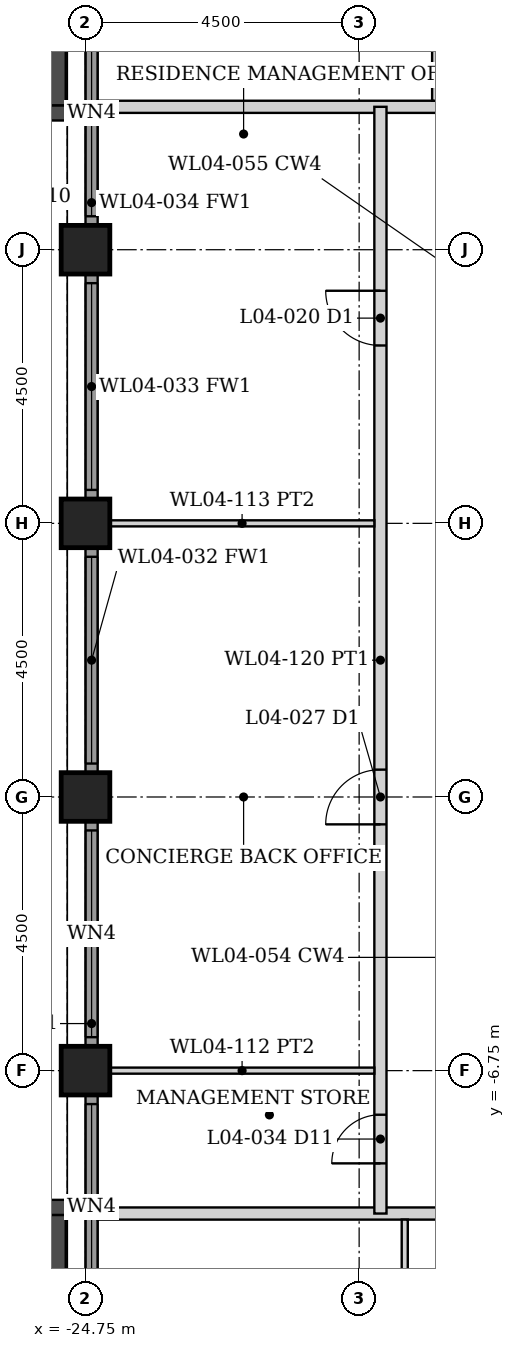
"""IFC4 building model, lengths in metres.
Left out: names, types, materials, properties, quantities, classifications, styles, units other than length and angle.
Written with IfcOpenShell. Run it as: python <this file> out.ifc"""

import sys

from ifc_helpers import new_model, si_unit, direction, frame, frame_2d, origin, origin_2d, place, context, subcontext, project, spatial, rectangle, hollow_rectangle, extrude, element, fill, save


model = new_model("IFC4")
c1 = context("Model", 3, precision=1e-05, world=origin(), true_north=direction((0.0, 1.0)))
c2 = subcontext(c1, "Body", "Model", "MODEL_VIEW")
j1 = project(units=[si_unit("LENGTHUNIT", "METRE"), si_unit("PLANEANGLEUNIT", "RADIAN")], contexts=[c1])
p1 = place(None, origin())
s1 = spatial("IfcSite", under=j1, at=p1, CompositionType="ELEMENT")
p2 = place(p1, origin())
s2 = spatial("IfcBuilding", under=s1, at=p2, CompositionType="ELEMENT")
p3 = place(p2, frame((0.0, 0.0, 21.5)))
s3 = spatial("IfcBuildingStorey", under=s2, at=p3, CompositionType="ELEMENT", Elevation=21.5)
for number, where, z_axis, x_axis in (
    (1, (-24.75, -6.75, 0.0), (0.0, 0.0, 1.0), (1.0, 0.0, 0.0)),
    (2, (-24.75, -2.25, 0.0), (0.0, 0.0, 1.0), (1.0, 0.0, 0.0)),
    (3, (-24.75, 2.25, 0.0), (0.0, 0.0, 1.0), (1.0, 0.0, 0.0)),
    (4, (-24.75, 6.75, 0.0), (0.0, 0.0, 1.0), (1.0, 0.0, 0.0)),
):
    element("IfcColumn", number, at=place(p3, frame(where, z_axis=z_axis, x_axis=x_axis)), inside=s3, PredefinedType="COLUMN", context=c2, shape_type="SweptSolid", body=[
        extrude(hollow_rectangle(XDim=0.8, YDim=0.8, WallThickness=0.08, at=origin_2d()), origin(), (0.0, 0.0, 1.0), 5.0),
    ])
p4 = place(p3, frame((-28.625, 9.0, 0.0), z_axis=(0.0, 0.0, 1.0), x_axis=(1.0, 0.0, 0.0)))
e5 = element("IfcWall", 5, at=p4, inside=s3, PredefinedType="SHEAR", context=c2, shape_type="SweptSolid", body=[
    extrude(rectangle(XDim=3.55, YDim=0.25, at=frame_2d((1.775, 0.0))), origin(), (0.0, 0.0, 1.0), 5.0),
])
p5 = place(p4, frame((1.875, 0.0, 0.0)))
e6 = element("IfcOpeningElement", 6, at=p5, cuts=e5, PredefinedType="OPENING", context=c2, shape_type="SweptSolid", body=[
    extrude(rectangle(XDim=1.2, YDim=2.2, at=frame_2d((0.6, 1.1))), frame((0.0, 0.135, 0.0), z_axis=(0.0, -1.0, 0.0), x_axis=(1.0, 0.0, 0.0)), (0.0, 0.0, 1.0), 0.27),
])
p6 = place(p3, frame((-25.2, 9.125, 0.0), z_axis=(0.0, 0.0, 1.0), x_axis=(0.0, 1.0, 0.0)))
e7 = element("IfcWall", 7, at=p6, inside=s3, PredefinedType="SHEAR", context=c2, shape_type="SweptSolid", body=[
    extrude(rectangle(XDim=7.25, YDim=0.25, at=frame_2d((3.625, 0.0))), origin(), (0.0, 0.0, 1.0), 5.0),
])
p7 = place(p3, frame((-28.625, -9.0, 0.0), z_axis=(0.0, 0.0, 1.0), x_axis=(1.0, 0.0, 0.0)))
e8 = element("IfcWall", 8, at=p7, inside=s3, PredefinedType="SHEAR", context=c2, shape_type="SweptSolid", body=[
    extrude(rectangle(XDim=3.55, YDim=0.25, at=frame_2d((1.775, 0.0))), origin(), (0.0, 0.0, 1.0), 5.0),
])
p8 = place(p7, frame((1.875, 0.0, 0.0)))
e9 = element("IfcOpeningElement", 9, at=p8, cuts=e8, PredefinedType="OPENING", context=c2, shape_type="SweptSolid", body=[
    extrude(rectangle(XDim=1.2, YDim=2.2, at=frame_2d((0.6, 1.1))), frame((0.0, 0.135, 0.0), z_axis=(0.0, -1.0, 0.0), x_axis=(1.0, 0.0, 0.0)), (0.0, 0.0, 1.0), 0.27),
])
p9 = place(p3, frame((-25.2, -16.375, 0.0), z_axis=(0.0, 0.0, 1.0), x_axis=(0.0, 1.0, 0.0)))
e10 = element("IfcWall", 10, at=p9, inside=s3, PredefinedType="SHEAR", context=c2, shape_type="SweptSolid", body=[
    extrude(rectangle(XDim=7.25, YDim=0.25, at=frame_2d((3.625, 0.0))), origin(), (0.0, 0.0, 1.0), 5.0),
])
p10 = place(p3, frame((-24.65, -10.845, 0.0), z_axis=(0.0, 0.0, 1.0), x_axis=(0.0, 1.0, 0.0)))
e11 = element("IfcWall", 11, at=p10, inside=s3, PredefinedType="SOLIDWALL", context=c2, shape_type="SweptSolid", body=[
    extrude(rectangle(XDim=3.69, YDim=0.2, at=frame_2d((1.845, 0.0))), origin(), (0.0, 0.0, 1.0), 3.879),
])
p11 = place(p10, frame((0.145, 0.0, 0.3)))
e12 = element("IfcOpeningElement", 12, at=p11, cuts=e11, PredefinedType="OPENING", context=c2, shape_type="SweptSolid", body=[
    extrude(rectangle(XDim=3.4, YDim=3.429, at=frame_2d((1.7, 1.714))), frame((0.0, 0.11, 0.0), z_axis=(0.0, -1.0, 0.0), x_axis=(1.0, 0.0, 0.0)), (0.0, 0.0, 1.0), 0.22),
])
p12 = place(p3, frame((-24.65, -6.345, 0.0), z_axis=(0.0, 0.0, 1.0), x_axis=(0.0, 1.0, 0.0)))
e13 = element("IfcWall", 13, at=p12, inside=s3, PredefinedType="SOLIDWALL", context=c2, shape_type="SweptSolid", body=[
    extrude(rectangle(XDim=3.69, YDim=0.2, at=frame_2d((1.845, 0.0))), origin(), (0.0, 0.0, 1.0), 3.879),
])
p13 = place(p12, frame((0.145, 0.0, 0.3)))
e14 = element("IfcOpeningElement", 14, at=p13, cuts=e13, PredefinedType="OPENING", context=c2, shape_type="SweptSolid", body=[
    extrude(rectangle(XDim=3.4, YDim=3.429, at=frame_2d((1.7, 1.714))), frame((0.0, 0.11, 0.0), z_axis=(0.0, -1.0, 0.0), x_axis=(1.0, 0.0, 0.0)), (0.0, 0.0, 1.0), 0.22),
])
p14 = place(p3, frame((-24.65, -1.845, 0.0), z_axis=(0.0, 0.0, 1.0), x_axis=(0.0, 1.0, 0.0)))
e15 = element("IfcWall", 15, at=p14, inside=s3, PredefinedType="SOLIDWALL", context=c2, shape_type="SweptSolid", body=[
    extrude(rectangle(XDim=3.69, YDim=0.2, at=frame_2d((1.845, 0.0))), origin(), (0.0, 0.0, 1.0), 3.879),
])
p15 = place(p14, frame((0.145, 0.0, 0.3)))
e16 = element("IfcOpeningElement", 16, at=p15, cuts=e15, PredefinedType="OPENING", context=c2, shape_type="SweptSolid", body=[
    extrude(rectangle(XDim=3.4, YDim=3.429, at=frame_2d((1.7, 1.714))), frame((0.0, 0.11, 0.0), z_axis=(0.0, -1.0, 0.0), x_axis=(1.0, 0.0, 0.0)), (0.0, 0.0, 1.0), 0.22),
])
p16 = place(p3, frame((-24.65, 2.655, 0.0), z_axis=(0.0, 0.0, 1.0), x_axis=(0.0, 1.0, 0.0)))
e17 = element("IfcWall", 17, at=p16, inside=s3, PredefinedType="SOLIDWALL", context=c2, shape_type="SweptSolid", body=[
    extrude(rectangle(XDim=3.69, YDim=0.2, at=frame_2d((1.845, 0.0))), origin(), (0.0, 0.0, 1.0), 3.879),
])
p17 = place(p16, frame((0.145, 0.0, 0.3)))
e18 = element("IfcOpeningElement", 18, at=p17, cuts=e17, PredefinedType="OPENING", context=c2, shape_type="SweptSolid", body=[
    extrude(rectangle(XDim=3.4, YDim=3.429, at=frame_2d((1.7, 1.714))), frame((0.0, 0.11, 0.0), z_axis=(0.0, -1.0, 0.0), x_axis=(1.0, 0.0, 0.0)), (0.0, 0.0, 1.0), 0.22),
])
p18 = place(p3, frame((-24.65, 7.155, 0.0), z_axis=(0.0, 0.0, 1.0), x_axis=(0.0, 1.0, 0.0)))
e19 = element("IfcWall", 19, at=p18, inside=s3, PredefinedType="SOLIDWALL", context=c2, shape_type="SweptSolid", body=[
    extrude(rectangle(XDim=3.69, YDim=0.2, at=frame_2d((1.845, 0.0))), origin(), (0.0, 0.0, 1.0), 3.879),
])
p19 = place(p18, frame((0.145, 0.0, 0.3)))
e20 = element("IfcOpeningElement", 20, at=p19, cuts=e19, PredefinedType="OPENING", context=c2, shape_type="SweptSolid", body=[
    extrude(rectangle(XDim=3.4, YDim=3.429, at=frame_2d((1.7, 1.714))), frame((0.0, 0.11, 0.0), z_axis=(0.0, -1.0, 0.0), x_axis=(1.0, 0.0, 0.0)), (0.0, 0.0, 1.0), 0.22),
])
p20 = place(p3, frame((-24.55, 9.1, 0.0), z_axis=(0.0, 0.0, 1.0), x_axis=(1.0, 0.0, 0.0)))
e21 = element("IfcWall", 21, at=p20, inside=s3, PredefinedType="PARTITIONING", context=c2, shape_type="SweptSolid", body=[
    extrude(rectangle(XDim=49.1, YDim=0.2, at=frame_2d((24.55, 0.0))), origin(), (0.0, 0.0, 1.0), 3.873),
])
p21 = place(p20, frame((6.684, 0.0, 0.0)))
e22 = element("IfcOpeningElement", 22, at=p21, cuts=e21, PredefinedType="OPENING", context=c2, shape_type="SweptSolid", body=[
    extrude(rectangle(XDim=0.9, YDim=2.1, at=frame_2d((0.45, 1.05))), frame((0.0, 0.11, 0.0), z_axis=(0.0, -1.0, 0.0), x_axis=(1.0, 0.0, 0.0)), (0.0, 0.0, 1.0), 0.22),
])
p22 = place(p20, frame((14.06, 0.0, 0.0)))
e23 = element("IfcOpeningElement", 23, at=p22, cuts=e21, PredefinedType="OPENING", context=c2, shape_type="SweptSolid", body=[
    extrude(rectangle(XDim=0.9, YDim=2.1, at=frame_2d((0.45, 1.05))), frame((0.0, 0.11, 0.0), z_axis=(0.0, -1.0, 0.0), x_axis=(1.0, 0.0, 0.0)), (0.0, 0.0, 1.0), 0.22),
])
p23 = place(p20, frame((9.65, 0.0, 0.0)))
e24 = element("IfcOpeningElement", 24, at=p23, cuts=e21, PredefinedType="OPENING", context=c2, shape_type="SweptSolid", body=[
    extrude(rectangle(XDim=0.8, YDim=2.1, at=frame_2d((0.4, 1.05))), frame((0.0, 0.11, 0.0), z_axis=(0.0, -1.0, 0.0), x_axis=(1.0, 0.0, 0.0)), (0.0, 0.0, 1.0), 0.22),
])
p24 = place(p20, frame((25.592, 0.0, 0.0)))
e25 = element("IfcOpeningElement", 25, at=p24, cuts=e21, PredefinedType="OPENING", context=c2, shape_type="SweptSolid", body=[
    extrude(rectangle(XDim=0.9, YDim=2.1, at=frame_2d((0.45, 1.05))), frame((0.0, 0.11, 0.0), z_axis=(0.0, -1.0, 0.0), x_axis=(1.0, 0.0, 0.0)), (0.0, 0.0, 1.0), 0.22),
])
p25 = place(p20, frame((27.368, 0.0, 0.0)))
e26 = element("IfcOpeningElement", 26, at=p25, cuts=e21, PredefinedType="OPENING", context=c2, shape_type="SweptSolid", body=[
    extrude(rectangle(XDim=0.9, YDim=2.1, at=frame_2d((0.45, 1.05))), frame((0.0, 0.11, 0.0), z_axis=(0.0, -1.0, 0.0), x_axis=(1.0, 0.0, 0.0)), (0.0, 0.0, 1.0), 0.22),
])
p26 = place(p20, frame((19.175, 0.0, 0.0)))
e27 = element("IfcOpeningElement", 27, at=p26, cuts=e21, PredefinedType="OPENING", context=c2, shape_type="SweptSolid", body=[
    extrude(rectangle(XDim=1.0, YDim=2.1, at=frame_2d((0.5, 1.05))), frame((0.0, 0.11, 0.0), z_axis=(0.0, -1.0, 0.0), x_axis=(1.0, 0.0, 0.0)), (0.0, 0.0, 1.0), 0.22),
])
p27 = place(p20, frame((22.925, 0.0, 0.0)))
e28 = element("IfcOpeningElement", 28, at=p27, cuts=e21, PredefinedType="OPENING", context=c2, shape_type="SweptSolid", body=[
    extrude(rectangle(XDim=1.0, YDim=2.1, at=frame_2d((0.5, 1.05))), frame((0.0, 0.11, 0.0), z_axis=(0.0, -1.0, 0.0), x_axis=(1.0, 0.0, 0.0)), (0.0, 0.0, 1.0), 0.22),
])
p28 = place(p20, frame((29.65, 0.0, 0.0)))
e29 = element("IfcOpeningElement", 29, at=p28, cuts=e21, PredefinedType="OPENING", context=c2, shape_type="SweptSolid", body=[
    extrude(rectangle(XDim=0.8, YDim=2.1, at=frame_2d((0.4, 1.05))), frame((0.0, 0.11, 0.0), z_axis=(0.0, -1.0, 0.0), x_axis=(1.0, 0.0, 0.0)), (0.0, 0.0, 1.0), 0.22),
])
p29 = place(p20, frame((35.375, 0.0, 0.0)))
e30 = element("IfcOpeningElement", 30, at=p29, cuts=e21, PredefinedType="OPENING", context=c2, shape_type="SweptSolid", body=[
    extrude(rectangle(XDim=0.9, YDim=2.1, at=frame_2d((0.45, 1.05))), frame((0.0, 0.11, 0.0), z_axis=(0.0, -1.0, 0.0), x_axis=(1.0, 0.0, 0.0)), (0.0, 0.0, 1.0), 0.22),
])
p30 = place(p20, frame((41.55, 0.0, 0.0)))
e31 = element("IfcOpeningElement", 31, at=p30, cuts=e21, PredefinedType="OPENING", context=c2, shape_type="SweptSolid", body=[
    extrude(rectangle(XDim=1.0, YDim=2.1, at=frame_2d((0.5, 1.05))), frame((0.0, 0.11, 0.0), z_axis=(0.0, -1.0, 0.0), x_axis=(1.0, 0.0, 0.0)), (0.0, 0.0, 1.0), 0.22),
])
p31 = place(p3, frame((-24.55, -9.1, 0.0), z_axis=(0.0, 0.0, 1.0), x_axis=(1.0, 0.0, 0.0)))
e32 = element("IfcWall", 32, at=p31, inside=s3, PredefinedType="PARTITIONING", context=c2, shape_type="SweptSolid", body=[
    extrude(rectangle(XDim=49.1, YDim=0.2, at=frame_2d((24.55, 0.0))), origin(), (0.0, 0.0, 1.0), 3.873),
])
p32 = place(p31, frame((6.452, 0.0, 0.0)))
e33 = element("IfcOpeningElement", 33, at=p32, cuts=e32, PredefinedType="OPENING", context=c2, shape_type="SweptSolid", body=[
    extrude(rectangle(XDim=0.9, YDim=2.1, at=frame_2d((0.45, 1.05))), frame((0.0, 0.11, 0.0), z_axis=(0.0, -1.0, 0.0), x_axis=(1.0, 0.0, 0.0)), (0.0, 0.0, 1.0), 0.22),
])
p33 = place(p31, frame((12.85, 0.0, 0.0)))
e34 = element("IfcOpeningElement", 34, at=p33, cuts=e32, PredefinedType="OPENING", context=c2, shape_type="SweptSolid", body=[
    extrude(rectangle(XDim=0.9, YDim=2.1, at=frame_2d((0.45, 1.05))), frame((0.0, 0.11, 0.0), z_axis=(0.0, -1.0, 0.0), x_axis=(1.0, 0.0, 0.0)), (0.0, 0.0, 1.0), 0.22),
])
p34 = place(p31, frame((20.934, 0.0, 0.0)))
e35 = element("IfcOpeningElement", 35, at=p34, cuts=e32, PredefinedType="OPENING", context=c2, shape_type="SweptSolid", body=[
    extrude(rectangle(XDim=0.9, YDim=2.1, at=frame_2d((0.45, 1.05))), frame((0.0, 0.11, 0.0), z_axis=(0.0, -1.0, 0.0), x_axis=(1.0, 0.0, 0.0)), (0.0, 0.0, 1.0), 0.22),
])
p35 = place(p31, frame((18.425, 0.0, 0.0)))
e36 = element("IfcOpeningElement", 36, at=p35, cuts=e32, PredefinedType="OPENING", context=c2, shape_type="SweptSolid", body=[
    extrude(rectangle(XDim=1.5, YDim=2.1, at=frame_2d((0.75, 1.05))), frame((0.0, 0.11, 0.0), z_axis=(0.0, -1.0, 0.0), x_axis=(1.0, 0.0, 0.0)), (0.0, 0.0, 1.0), 0.22),
])
p36 = place(p31, frame((30.18, 0.0, 0.0)))
e37 = element("IfcOpeningElement", 37, at=p36, cuts=e32, PredefinedType="OPENING", context=c2, shape_type="SweptSolid", body=[
    extrude(rectangle(XDim=0.9, YDim=2.1, at=frame_2d((0.45, 1.05))), frame((0.0, 0.11, 0.0), z_axis=(0.0, -1.0, 0.0), x_axis=(1.0, 0.0, 0.0)), (0.0, 0.0, 1.0), 0.22),
])
p37 = place(p31, frame((23.3, 0.0, 0.0)))
e38 = element("IfcOpeningElement", 38, at=p37, cuts=e32, PredefinedType="OPENING", context=c2, shape_type="SweptSolid", body=[
    extrude(rectangle(XDim=1.0, YDim=2.1, at=frame_2d((0.5, 1.05))), frame((0.0, 0.11, 0.0), z_axis=(0.0, -1.0, 0.0), x_axis=(1.0, 0.0, 0.0)), (0.0, 0.0, 1.0), 0.22),
])
p38 = place(p31, frame((26.15, 0.0, 0.0)))
e39 = element("IfcOpeningElement", 39, at=p38, cuts=e32, PredefinedType="OPENING", context=c2, shape_type="SweptSolid", body=[
    extrude(rectangle(XDim=0.8, YDim=2.1, at=frame_2d((0.4, 1.05))), frame((0.0, 0.11, 0.0), z_axis=(0.0, -1.0, 0.0), x_axis=(1.0, 0.0, 0.0)), (0.0, 0.0, 1.0), 0.22),
])
p39 = place(p31, frame((28.4, 0.0, 0.0)))
e40 = element("IfcOpeningElement", 40, at=p39, cuts=e32, PredefinedType="OPENING", context=c2, shape_type="SweptSolid", body=[
    extrude(rectangle(XDim=1.0, YDim=2.1, at=frame_2d((0.5, 1.05))), frame((0.0, 0.11, 0.0), z_axis=(0.0, -1.0, 0.0), x_axis=(1.0, 0.0, 0.0)), (0.0, 0.0, 1.0), 0.22),
])
p40 = place(p31, frame((33.05, 0.0, 0.0)))
e41 = element("IfcOpeningElement", 41, at=p40, cuts=e32, PredefinedType="OPENING", context=c2, shape_type="SweptSolid", body=[
    extrude(rectangle(XDim=1.0, YDim=2.1, at=frame_2d((0.5, 1.05))), frame((0.0, 0.11, 0.0), z_axis=(0.0, -1.0, 0.0), x_axis=(1.0, 0.0, 0.0)), (0.0, 0.0, 1.0), 0.22),
])
p41 = place(p31, frame((37.625, 0.0, 0.0)))
e42 = element("IfcOpeningElement", 42, at=p41, cuts=e32, PredefinedType="OPENING", context=c2, shape_type="SweptSolid", body=[
    extrude(rectangle(XDim=0.9, YDim=2.1, at=frame_2d((0.45, 1.05))), frame((0.0, 0.11, 0.0), z_axis=(0.0, -1.0, 0.0), x_axis=(1.0, 0.0, 0.0)), (0.0, 0.0, 1.0), 0.22),
])
p42 = place(p31, frame((40.8, 0.0, 0.0)))
e43 = element("IfcOpeningElement", 43, at=p42, cuts=e32, PredefinedType="OPENING", context=c2, shape_type="SweptSolid", body=[
    extrude(rectangle(XDim=1.0, YDim=2.1, at=frame_2d((0.5, 1.05))), frame((0.0, 0.11, 0.0), z_axis=(0.0, -1.0, 0.0), x_axis=(1.0, 0.0, 0.0)), (0.0, 0.0, 1.0), 0.22),
])
p43 = place(p31, frame((42.8, 0.0, 0.0)))
e44 = element("IfcOpeningElement", 44, at=p43, cuts=e32, PredefinedType="OPENING", context=c2, shape_type="SweptSolid", body=[
    extrude(rectangle(XDim=1.0, YDim=2.1, at=frame_2d((0.5, 1.05))), frame((0.0, 0.11, 0.0), z_axis=(0.0, -1.0, 0.0), x_axis=(1.0, 0.0, 0.0)), (0.0, 0.0, 1.0), 0.22),
])
p44 = place(p3, frame((-19.9, -9.1, 0.0), z_axis=(0.0, 0.0, 1.0), x_axis=(0.0, 1.0, 0.0)))
e45 = element("IfcWall", 45, at=p44, inside=s3, PredefinedType="PARTITIONING", context=c2, shape_type="SweptSolid", body=[
    extrude(rectangle(XDim=18.2, YDim=0.2, at=frame_2d((9.1, 0.0))), origin(), (0.0, 0.0, 1.0), 3.873),
])
p45 = place(p44, frame((0.825, 0.0, 0.0)))
e46 = element("IfcOpeningElement", 46, at=p45, cuts=e45, PredefinedType="OPENING", context=c2, shape_type="SweptSolid", body=[
    extrude(rectangle(XDim=0.8, YDim=2.1, at=frame_2d((0.4, 1.05))), frame((0.0, 0.11, 0.0), z_axis=(0.0, -1.0, 0.0), x_axis=(1.0, 0.0, 0.0)), (0.0, 0.0, 1.0), 0.22),
])
p46 = place(p44, frame((6.4, 0.0, 0.0)))
e47 = element("IfcOpeningElement", 47, at=p46, cuts=e45, PredefinedType="OPENING", context=c2, shape_type="SweptSolid", body=[
    extrude(rectangle(XDim=0.9, YDim=2.1, at=frame_2d((0.45, 1.05))), frame((0.0, 0.11, 0.0), z_axis=(0.0, -1.0, 0.0), x_axis=(1.0, 0.0, 0.0)), (0.0, 0.0, 1.0), 0.22),
])
p47 = place(p44, frame((14.275, 0.0, 0.0)))
e48 = element("IfcOpeningElement", 48, at=p47, cuts=e45, PredefinedType="OPENING", context=c2, shape_type="SweptSolid", body=[
    extrude(rectangle(XDim=0.9, YDim=2.1, at=frame_2d((0.45, 1.05))), frame((0.0, 0.11, 0.0), z_axis=(0.0, -1.0, 0.0), x_axis=(1.0, 0.0, 0.0)), (0.0, 0.0, 1.0), 0.22),
])
p48 = place(p3, frame((-19.0, 9.2, 0.0), z_axis=(0.0, 0.0, 1.0), x_axis=(0.0, 1.0, 0.0)))
e49 = element("IfcWall", 49, at=p48, inside=s3, PredefinedType="PARTITIONING", context=c2, shape_type="SweptSolid", body=[
    extrude(rectangle(XDim=4.8, YDim=0.1, at=frame_2d((2.4, 0.0))), origin(), (0.0, 0.0, 1.0), 3.873),
])
p49 = place(p3, frame((-19.5, -14.5, 0.0), z_axis=(0.0, 0.0, 1.0), x_axis=(0.0, 1.0, 0.0)))
e50 = element("IfcWall", 50, at=p49, inside=s3, PredefinedType="PARTITIONING", context=c2, shape_type="SweptSolid", body=[
    extrude(rectangle(XDim=5.3, YDim=0.1, at=frame_2d((2.65, 0.0))), origin(), (0.0, 0.0, 1.0), 3.873),
])
for number, where, z_axis, x_axis in (
    (51, (-24.35, -6.75, 0.0), (0.0, 0.0, 1.0), (1.0, 0.0, 0.0)),
    (52, (-24.35, 2.25, 0.0), (0.0, 0.0, 1.0), (1.0, 0.0, 0.0)),
):
    element("IfcWall", number, at=place(p3, frame(where, z_axis=z_axis, x_axis=x_axis)), inside=s3, PredefinedType="PARTITIONING", context=c2, shape_type="SweptSolid", body=[
        extrude(rectangle(XDim=4.35, YDim=0.1, at=frame_2d((2.175, 0.0))), origin(), (0.0, 0.0, 1.0), 3.873),
    ])
p50 = place(p11, origin())
e53 = element("IfcWindow", 53, at=p50, inside=s3, PartitioningType="SINGLE_PANEL", PredefinedType="WINDOW", context=c2, shape_type="SweptSolid", body=[
    extrude(rectangle(XDim=3.4, YDim=3.429, at=frame_2d((1.7, 1.714))), frame((0.0, 0.03, 0.0), z_axis=(0.0, -1.0, 0.0), x_axis=(1.0, 0.0, 0.0)), (0.0, 0.0, 1.0), 0.06),
])
fill(e12, e53)
p51 = place(p13, origin())
e54 = element("IfcWindow", 54, at=p51, inside=s3, PartitioningType="SINGLE_PANEL", PredefinedType="WINDOW", context=c2, shape_type="SweptSolid", body=[
    extrude(rectangle(XDim=3.4, YDim=3.429, at=frame_2d((1.7, 1.714))), frame((0.0, 0.03, 0.0), z_axis=(0.0, -1.0, 0.0), x_axis=(1.0, 0.0, 0.0)), (0.0, 0.0, 1.0), 0.06),
])
fill(e14, e54)
p52 = place(p15, origin())
e55 = element("IfcWindow", 55, at=p52, inside=s3, PartitioningType="SINGLE_PANEL", PredefinedType="WINDOW", context=c2, shape_type="SweptSolid", body=[
    extrude(rectangle(XDim=3.4, YDim=3.429, at=frame_2d((1.7, 1.714))), frame((0.0, 0.03, 0.0), z_axis=(0.0, -1.0, 0.0), x_axis=(1.0, 0.0, 0.0)), (0.0, 0.0, 1.0), 0.06),
])
fill(e16, e55)
p53 = place(p17, origin())
e56 = element("IfcWindow", 56, at=p53, inside=s3, PartitioningType="SINGLE_PANEL", PredefinedType="WINDOW", context=c2, shape_type="SweptSolid", body=[
    extrude(rectangle(XDim=3.4, YDim=3.429, at=frame_2d((1.7, 1.714))), frame((0.0, 0.03, 0.0), z_axis=(0.0, -1.0, 0.0), x_axis=(1.0, 0.0, 0.0)), (0.0, 0.0, 1.0), 0.06),
])
fill(e18, e56)
p54 = place(p19, origin())
e57 = element("IfcWindow", 57, at=p54, inside=s3, PartitioningType="SINGLE_PANEL", PredefinedType="WINDOW", context=c2, shape_type="SweptSolid", body=[
    extrude(rectangle(XDim=3.4, YDim=3.429, at=frame_2d((1.7, 1.714))), frame((0.0, 0.03, 0.0), z_axis=(0.0, -1.0, 0.0), x_axis=(1.0, 0.0, 0.0)), (0.0, 0.0, 1.0), 0.06),
])
fill(e20, e57)
p55 = place(p45, origin())
e58 = element("IfcDoor", 58, at=p55, inside=s3, OperationType="SINGLE_SWING_LEFT", PredefinedType="DOOR", context=c2, shape_type="SweptSolid", body=[
    extrude(rectangle(XDim=0.8, YDim=2.1, at=frame_2d((0.4, 1.05))), frame((0.0, 0.025, 0.0), z_axis=(0.0, -1.0, 0.0), x_axis=(1.0, 0.0, 0.0)), (0.0, 0.0, 1.0), 0.05),
])
fill(e46, e58)
p56 = place(p46, origin())
e59 = element("IfcDoor", 59, at=p56, inside=s3, OperationType="SINGLE_SWING_LEFT", PredefinedType="DOOR", context=c2, shape_type="SweptSolid", body=[
    extrude(rectangle(XDim=0.9, YDim=2.1, at=frame_2d((0.45, 1.05))), frame((0.0, 0.025, 0.0), z_axis=(0.0, -1.0, 0.0), x_axis=(1.0, 0.0, 0.0)), (0.0, 0.0, 1.0), 0.05),
])
fill(e47, e59)
p57 = place(p47, origin())
e60 = element("IfcDoor", 60, at=p57, inside=s3, OperationType="SINGLE_SWING_RIGHT", PredefinedType="DOOR", context=c2, shape_type="SweptSolid", body=[
    extrude(rectangle(XDim=0.9, YDim=2.1, at=frame_2d((0.45, 1.05))), frame((0.0, 0.025, 0.0), z_axis=(0.0, -1.0, 0.0), x_axis=(1.0, 0.0, 0.0)), (0.0, 0.0, 1.0), 0.05),
])
fill(e48, e60)
save(model, sys.argv[1])
